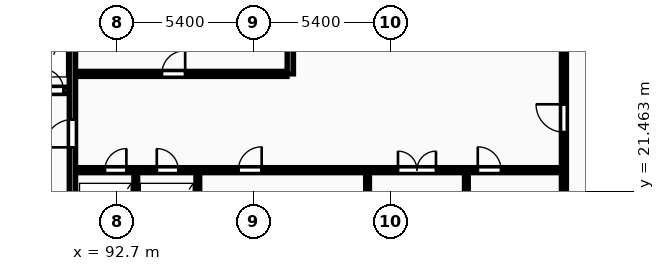
"""IFC4 building model, lengths in metres.
Left out: names, types, materials, properties, quantities, classifications, styles, units other than length and angle.
Written with IfcOpenShell. Run it as: python <this file> out.ifc"""

import sys

from ifc_helpers import new_model, si_unit, direction, frame, frame_2d, origin, place, context, subcontext, project, spatial, rectangle, extrude, element, fill, save


model = new_model("IFC4")
c1 = context("Model", 3, precision=1e-05, world=origin(), true_north=direction((0.0, 1.0)))
c2 = subcontext(c1, "Body", "Model", "MODEL_VIEW")
j1 = project(units=[si_unit("LENGTHUNIT", "METRE"), si_unit("PLANEANGLEUNIT", "RADIAN")], contexts=[c1])
p1 = place(None, origin())
s1 = spatial("IfcSite", under=j1, at=p1, CompositionType="ELEMENT")
p2 = place(p1, origin())
s2 = spatial("IfcBuilding", under=s1, at=p2, CompositionType="ELEMENT")
p3 = place(p2, frame((0.0, 0.0, 113.3)))
s3 = spatial("IfcBuildingStorey", under=s2, at=p3, CompositionType="ELEMENT", Elevation=113.3)
p4 = place(p3, frame((86.5, 25.45, 0.0), z_axis=(0.0, 0.0, 1.0), x_axis=(1.0, 0.0, 0.0)))
e1 = element("IfcWall", 1, at=p4, inside=s3, PredefinedType="SHEAR", context=c2, shape_type="SweptSolid", body=[
    extrude(rectangle(XDim=4.32, YDim=0.25, at=frame_2d((2.16, 0.0))), origin(), (0.0, 0.0, 1.0), 3.25),
])
p5 = place(p4, frame((1.14, 0.0, 0.0)))
e2 = element("IfcOpeningElement", 2, at=p5, cuts=e1, PredefinedType="OPENING", context=c2, shape_type="SweptSolid", body=[
    extrude(rectangle(XDim=1.12, YDim=2.12, at=frame_2d((0.56, 1.06))), frame((0.0, 0.135, 0.0), z_axis=(0.0, -1.0, 0.0), x_axis=(1.0, 0.0, 0.0)), (0.0, 0.0, 1.0), 0.27),
])
p6 = place(p4, frame((3.25, 0.0, 0.0)))
e3 = element("IfcOpeningElement", 3, at=p6, cuts=e1, PredefinedType="OPENING", context=c2, shape_type="SweptSolid", body=[
    extrude(rectangle(XDim=0.85, YDim=2.05, at=frame_2d((0.425, 1.025))), frame((0.0, 0.135, 0.0), z_axis=(0.0, -1.0, 0.0), x_axis=(1.0, 0.0, 0.0)), (0.0, 0.0, 1.0), 0.27),
])
p7 = place(p3, frame((90.95, 18.6, 0.0), z_axis=(0.0, 0.0, 1.0), x_axis=(0.0, 1.0, 0.0)))
e4 = element("IfcWall", 4, at=p7, inside=s3, PredefinedType="SHEAR", context=c2, shape_type="SweptSolid", body=[
    extrude(rectangle(XDim=11.6, YDim=0.25, at=frame_2d((5.8, 0.0))), origin(), (0.0, 0.0, 1.0), 3.25),
])
p8 = place(p7, frame((4.6, 0.0, 0.0)))
e5 = element("IfcOpeningElement", 5, at=p8, cuts=e4, PredefinedType="OPENING", context=c2, shape_type="SweptSolid", body=[
    extrude(rectangle(XDim=1.1, YDim=2.1, at=frame_2d((0.55, 1.05))), frame((0.0, 0.135, 0.0), z_axis=(0.0, -1.0, 0.0), x_axis=(1.0, 0.0, 0.0)), (0.0, 0.0, 1.0), 0.27),
])
p9 = place(p3, frame((91.08, 26.1, 0.0), z_axis=(0.0, 0.0, 1.0), x_axis=(1.0, 0.0, 0.0)))
e6 = element("IfcWall", 6, at=p9, inside=s3, PredefinedType="PARTITIONING", context=c2, shape_type="SweptSolid", body=[
    extrude(rectangle(XDim=8.34, YDim=0.2, at=frame_2d((4.17, 0.0))), origin(), (0.0, 0.0, 1.0), 2.97),
])
p10 = place(p9, frame((3.4, 0.0, 0.0)))
e7 = element("IfcOpeningElement", 7, at=p10, cuts=e6, PredefinedType="OPENING", context=c2, shape_type="SweptSolid", body=[
    extrude(rectangle(XDim=0.92, YDim=2.08, at=frame_2d((0.46, 1.04))), frame((0.0, 0.11, 0.0), z_axis=(0.0, -1.0, 0.0), x_axis=(1.0, 0.0, 0.0)), (0.0, 0.0, 1.0), 0.22),
])
p11 = place(p3, frame((99.55, 26.1, 0.0), z_axis=(0.0, 0.0, 1.0), x_axis=(0.0, 1.0, 0.0)))
e8 = element("IfcWall", 8, at=p11, inside=s3, PredefinedType="SHEAR", context=c2, shape_type="SweptSolid", body=[
    extrude(rectangle(XDim=4.1, YDim=0.25, at=frame_2d((2.05, 0.0))), origin(), (0.0, 0.0, 1.0), 3.25),
])
for number, where, z_axis, x_axis in (
    (9, (93.45, 18.6, 0.0), (0.0, 0.0, 1.0), (0.0, 1.0, 0.0)),
    (10, (95.9, 18.6, 0.0), (0.0, 0.0, 1.0), (0.0, 1.0, 0.0)),
    (11, (102.6, 18.6, 0.0), (0.0, 0.0, 1.0), (0.0, 1.0, 0.0)),
    (12, (106.5, 18.6, 0.0), (0.0, 0.0, 1.0), (0.0, 1.0, 0.0)),
):
    element("IfcWall", number, at=place(p3, frame(where, z_axis=z_axis, x_axis=x_axis)), inside=s3, PredefinedType="PARTITIONING", context=c2, shape_type="SweptSolid", body=[
        extrude(rectangle(XDim=3.6, YDim=0.15, at=frame_2d((1.8, 0.0))), origin(), (0.0, 0.0, 1.0), 2.97),
    ])
p12 = place(p3, frame((91.08, 22.3, 0.0), z_axis=(0.0, 0.0, 1.0), x_axis=(1.0, 0.0, 0.0)))
e13 = element("IfcWall", 13, at=p12, inside=s3, PredefinedType="PARTITIONING", context=c2, shape_type="SweptSolid", body=[
    extrude(rectangle(XDim=19.14, YDim=0.2, at=frame_2d((9.57, 0.0))), origin(), (0.0, 0.0, 1.0), 2.97),
])
p13 = place(p12, frame((1.15, 0.0, 0.0)))
e14 = element("IfcOpeningElement", 14, at=p13, cuts=e13, PredefinedType="OPENING", context=c2, shape_type="SweptSolid", body=[
    extrude(rectangle(XDim=0.85, YDim=2.05, at=frame_2d((0.425, 1.025))), frame((0.0, 0.11, 0.0), z_axis=(0.0, -1.0, 0.0), x_axis=(1.0, 0.0, 0.0)), (0.0, 0.0, 1.0), 0.22),
])
p14 = place(p12, frame((3.2, 0.0, 0.0)))
e15 = element("IfcOpeningElement", 15, at=p14, cuts=e13, PredefinedType="OPENING", context=c2, shape_type="SweptSolid", body=[
    extrude(rectangle(XDim=0.85, YDim=2.05, at=frame_2d((0.425, 1.025))), frame((0.0, 0.11, 0.0), z_axis=(0.0, -1.0, 0.0), x_axis=(1.0, 0.0, 0.0)), (0.0, 0.0, 1.0), 0.22),
])
p15 = place(p12, frame((12.72, 0.0, 0.0)))
e16 = element("IfcOpeningElement", 16, at=p15, cuts=e13, PredefinedType="OPENING", context=c2, shape_type="SweptSolid", body=[
    extrude(rectangle(XDim=1.5, YDim=2.2, at=frame_2d((0.75, 1.1))), frame((0.0, 0.11, 0.0), z_axis=(0.0, -1.0, 0.0), x_axis=(1.0, 0.0, 0.0)), (0.0, 0.0, 1.0), 0.22),
])
p16 = place(p12, frame((6.42, 0.0, 0.0)))
e17 = element("IfcOpeningElement", 17, at=p16, cuts=e13, PredefinedType="OPENING", context=c2, shape_type="SweptSolid", body=[
    extrude(rectangle(XDim=0.92, YDim=2.08, at=frame_2d((0.46, 1.04))), frame((0.0, 0.11, 0.0), z_axis=(0.0, -1.0, 0.0), x_axis=(1.0, 0.0, 0.0)), (0.0, 0.0, 1.0), 0.22),
])
p17 = place(p12, frame((15.87, 0.0, 0.0)))
e18 = element("IfcOpeningElement", 18, at=p17, cuts=e13, PredefinedType="OPENING", context=c2, shape_type="SweptSolid", body=[
    extrude(rectangle(XDim=0.92, YDim=2.08, at=frame_2d((0.46, 1.04))), frame((0.0, 0.11, 0.0), z_axis=(0.0, -1.0, 0.0), x_axis=(1.0, 0.0, 0.0)), (0.0, 0.0, 1.0), 0.22),
])
p18 = place(p3, frame((110.35, 18.6, 0.0), z_axis=(0.0, 0.0, 1.0), x_axis=(0.0, 1.0, 0.0)))
e19 = element("IfcWall", 19, at=p18, inside=s3, PredefinedType="PARTITIONING", context=c2, shape_type="SweptSolid", body=[
    extrude(rectangle(XDim=11.6, YDim=0.2, at=frame_2d((5.8, 0.0))), origin(), (0.0, 0.0, 1.0), 2.97),
])
p19 = place(p18, frame((5.2, 0.0, 0.0)))
e20 = element("IfcOpeningElement", 20, at=p19, cuts=e19, PredefinedType="OPENING", context=c2, shape_type="SweptSolid", body=[
    extrude(rectangle(XDim=1.1, YDim=2.15, at=frame_2d((0.55, 1.075))), frame((0.0, 0.11, 0.0), z_axis=(0.0, -1.0, 0.0), x_axis=(1.0, 0.0, 0.0)), (0.0, 0.0, 1.0), 0.22),
])
p20 = place(p6, origin())
e21 = element("IfcDoor", 21, at=p20, inside=s3, OperationType="SINGLE_SWING_LEFT", PredefinedType="DOOR", context=c2, shape_type="SweptSolid", body=[
    extrude(rectangle(XDim=0.85, YDim=2.05, at=frame_2d((0.425, 1.025))), frame((0.0, 0.025, 0.0), z_axis=(0.0, -1.0, 0.0), x_axis=(1.0, 0.0, 0.0)), (0.0, 0.0, 1.0), 0.05),
])
fill(e3, e21)
p21 = place(p8, origin())
e22 = element("IfcDoor", 22, at=p21, inside=s3, OperationType="SINGLE_SWING_LEFT", PredefinedType="DOOR", context=c2, shape_type="SweptSolid", body=[
    extrude(rectangle(XDim=1.1, YDim=2.1, at=frame_2d((0.55, 1.05))), frame((0.0, 0.025, 0.0), z_axis=(0.0, -1.0, 0.0), x_axis=(1.0, 0.0, 0.0)), (0.0, 0.0, 1.0), 0.05),
])
fill(e5, e22)
p22 = place(p10, origin())
e23 = element("IfcDoor", 23, at=p22, inside=s3, OperationType="SINGLE_SWING_RIGHT", PredefinedType="DOOR", context=c2, shape_type="SweptSolid", body=[
    extrude(rectangle(XDim=0.92, YDim=2.08, at=frame_2d((0.46, 1.04))), frame((0.0, 0.025, 0.0), z_axis=(0.0, -1.0, 0.0), x_axis=(1.0, 0.0, 0.0)), (0.0, 0.0, 1.0), 0.05),
])
fill(e7, e23)
p23 = place(p13, origin())
e24 = element("IfcDoor", 24, at=p23, inside=s3, OperationType="SINGLE_SWING_RIGHT", PredefinedType="DOOR", context=c2, shape_type="SweptSolid", body=[
    extrude(rectangle(XDim=0.85, YDim=2.05, at=frame_2d((0.425, 1.025))), frame((0.0, 0.025, 0.0), z_axis=(0.0, -1.0, 0.0), x_axis=(1.0, 0.0, 0.0)), (0.0, 0.0, 1.0), 0.05),
])
fill(e14, e24)
p24 = place(p14, origin())
e25 = element("IfcDoor", 25, at=p24, inside=s3, OperationType="SINGLE_SWING_LEFT", PredefinedType="DOOR", context=c2, shape_type="SweptSolid", body=[
    extrude(rectangle(XDim=0.85, YDim=2.05, at=frame_2d((0.425, 1.025))), frame((0.0, 0.025, 0.0), z_axis=(0.0, -1.0, 0.0), x_axis=(1.0, 0.0, 0.0)), (0.0, 0.0, 1.0), 0.05),
])
fill(e15, e25)
p25 = place(p15, origin())
e26 = element("IfcDoor", 26, at=p25, inside=s3, OperationType="DOUBLE_DOOR_SINGLE_SWING", PredefinedType="DOOR", context=c2, shape_type="SweptSolid", body=[
    extrude(rectangle(XDim=1.5, YDim=2.2, at=frame_2d((0.75, 1.1))), frame((0.0, 0.025, 0.0), z_axis=(0.0, -1.0, 0.0), x_axis=(1.0, 0.0, 0.0)), (0.0, 0.0, 1.0), 0.05),
])
fill(e16, e26)
p26 = place(p16, origin())
e27 = element("IfcDoor", 27, at=p26, inside=s3, OperationType="SINGLE_SWING_RIGHT", PredefinedType="DOOR", context=c2, shape_type="SweptSolid", body=[
    extrude(rectangle(XDim=0.92, YDim=2.08, at=frame_2d((0.46, 1.04))), frame((0.0, 0.025, 0.0), z_axis=(0.0, -1.0, 0.0), x_axis=(1.0, 0.0, 0.0)), (0.0, 0.0, 1.0), 0.05),
])
fill(e17, e27)
p27 = place(p17, origin())
e28 = element("IfcDoor", 28, at=p27, inside=s3, OperationType="SINGLE_SWING_LEFT", PredefinedType="DOOR", context=c2, shape_type="SweptSolid", body=[
    extrude(rectangle(XDim=0.92, YDim=2.08, at=frame_2d((0.46, 1.04))), frame((0.0, 0.025, 0.0), z_axis=(0.0, -1.0, 0.0), x_axis=(1.0, 0.0, 0.0)), (0.0, 0.0, 1.0), 0.05),
])
fill(e18, e28)
p28 = place(p19, origin())
e29 = element("IfcDoor", 29, at=p28, inside=s3, OperationType="SINGLE_SWING_RIGHT", PredefinedType="DOOR", context=c2, shape_type="SweptSolid", body=[
    extrude(rectangle(XDim=1.1, YDim=2.15, at=frame_2d((0.55, 1.075))), frame((0.0, 0.025, 0.0), z_axis=(0.0, -1.0, 0.0), x_axis=(1.0, 0.0, 0.0)), (0.0, 0.0, 1.0), 0.05),
])
fill(e20, e29)
save(model, sys.argv[1])
